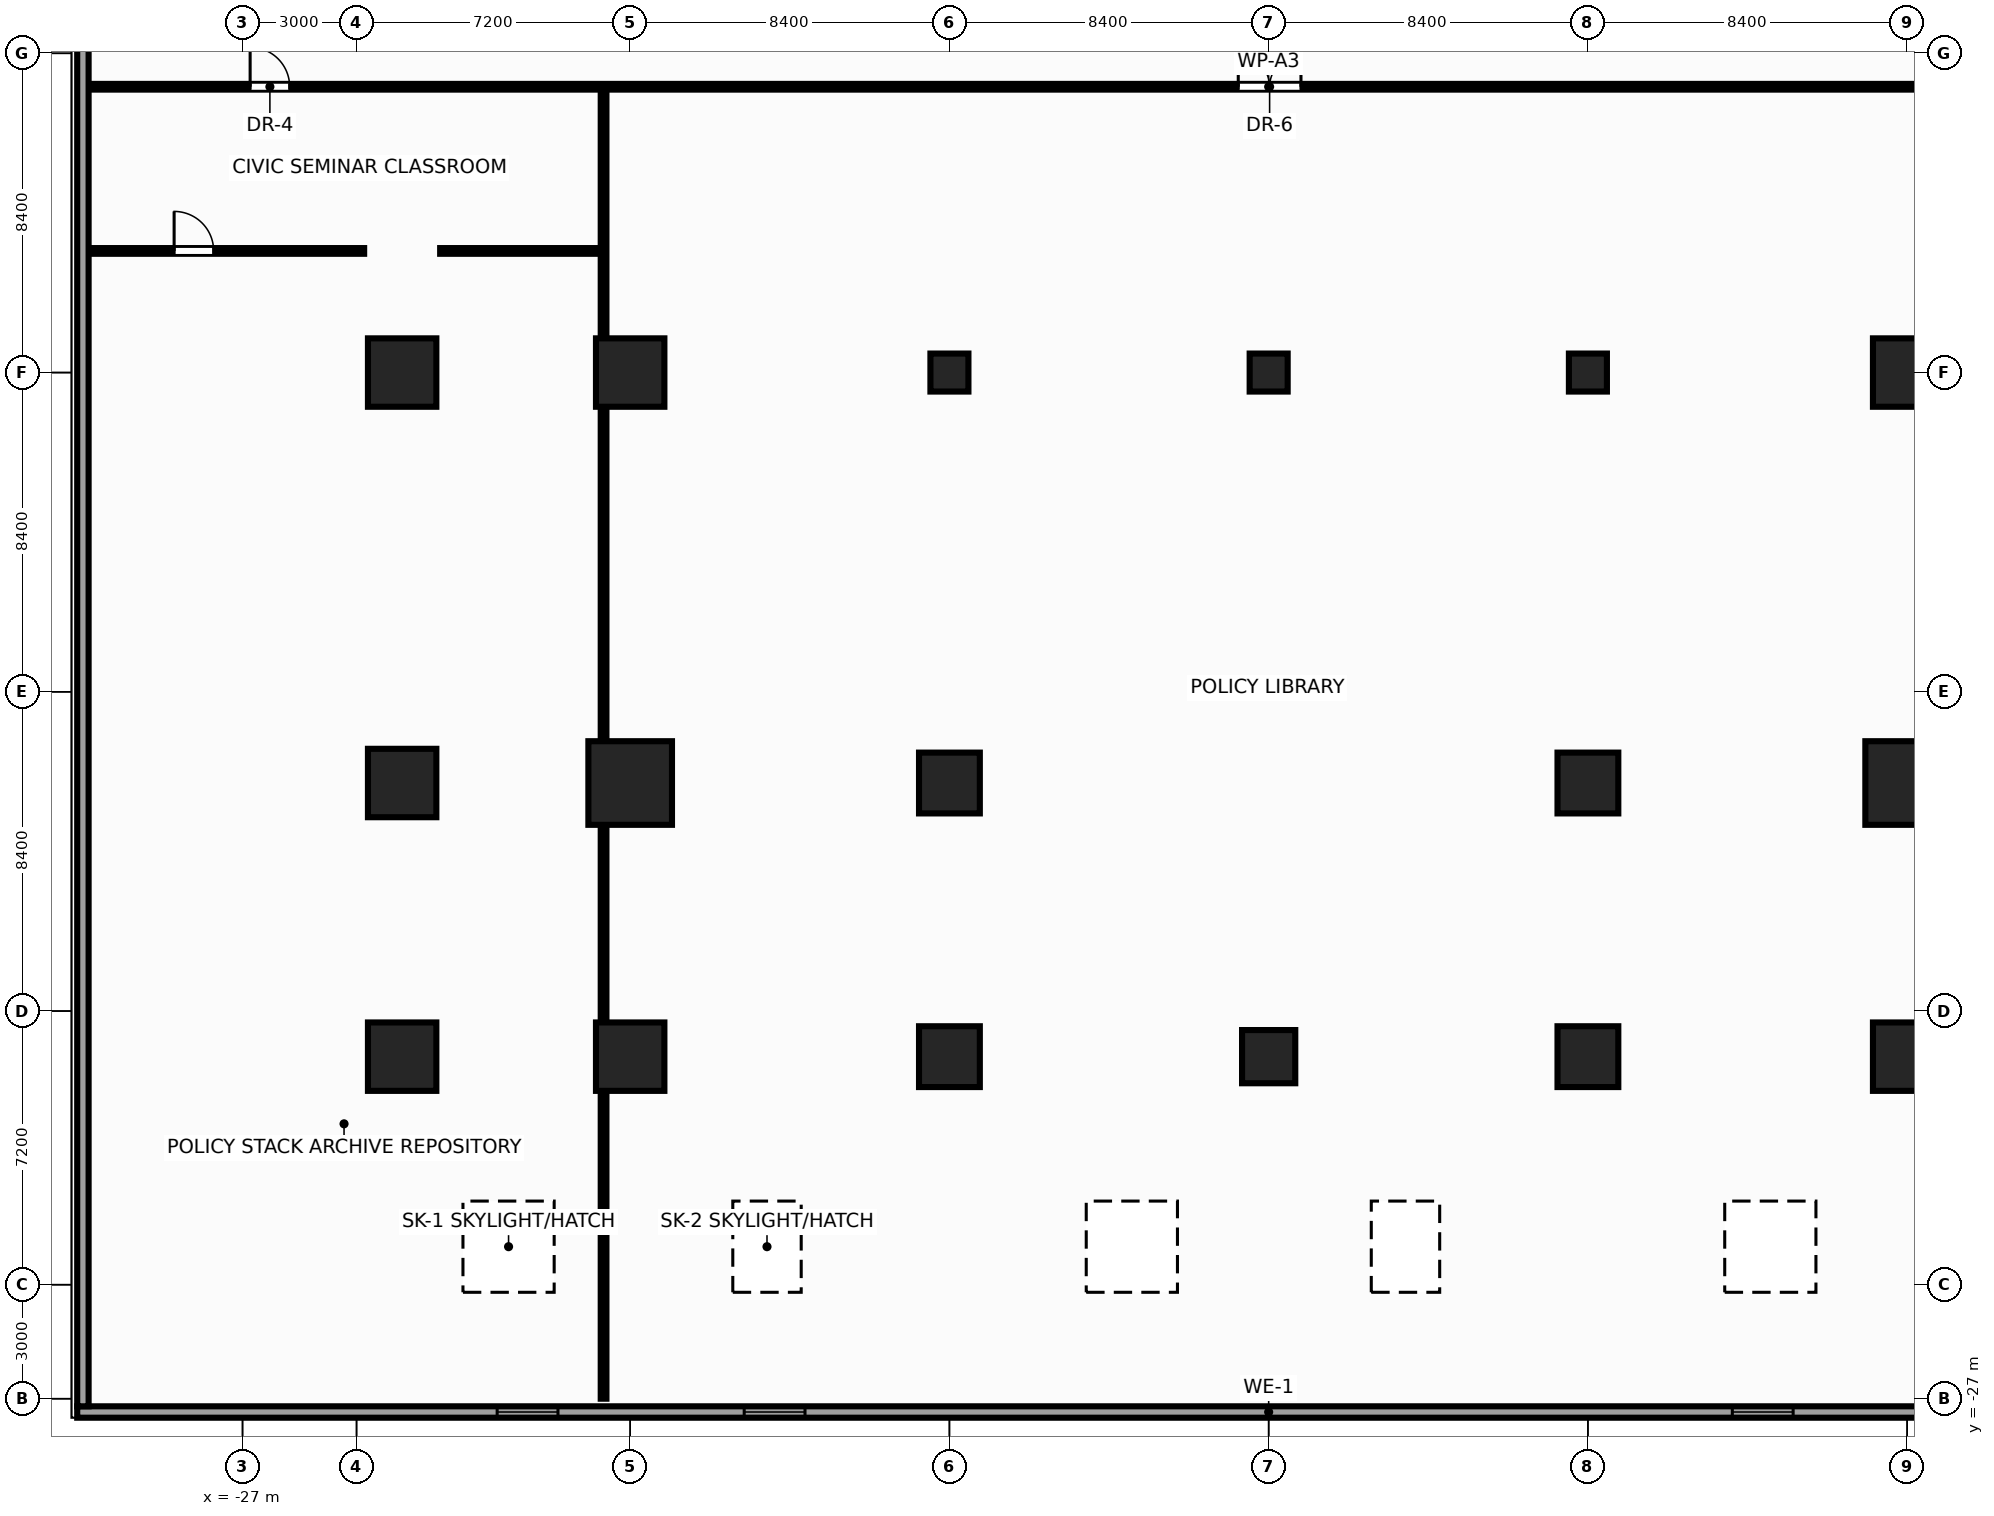
"""IFC4 building model, lengths in metres.
Left out: names, types, materials, properties, quantities, classifications, styles, units other than length and angle.
Written with IfcOpenShell. Run it as: python <this file> out.ifc"""

import sys

from ifc_helpers import new_model, si_unit, direction, frame, frame_2d, origin, origin_with_axes, origin_2d, place, context, subcontext, project, spatial, rectangle, hollow_rectangle, extrude, source, transform, mapped, element, fill, save


model = new_model("IFC4")
c1 = context("Model", 3, precision=1e-05, world=origin(), true_north=direction((0.0, 1.0)))
c2 = subcontext(c1, "Body", "Model", "MODEL_VIEW")
j1 = project(units=[si_unit("LENGTHUNIT", "METRE"), si_unit("PLANEANGLEUNIT", "RADIAN")], contexts=[c1])
p1 = place(None, origin())
s1 = spatial("IfcSite", under=j1, at=p1, CompositionType="ELEMENT")
p2 = place(p1, origin())
s2 = spatial("IfcBuilding", under=s1, at=p2, CompositionType="ELEMENT")
p3 = place(p2, frame((0.0, 0.0, 14.3)))
s3 = spatial("IfcBuildingStorey", under=s2, at=p3, CompositionType="ELEMENT", Elevation=14.3)
m1 = source(origin(), c2, "Body", "SweptSolid", [
    extrude(rectangle(XDim=1.8, YDim=1.8, at=origin_2d()), origin(), (0.0, 0.0, 1.0), 4.65),
])
p4 = place(p3, frame((-16.8, -18.0, 0.0), z_axis=(0.0, 0.0, 1.0), x_axis=(1.0, 0.0, 0.0)))
e1 = element("IfcColumn", 1, at=p4, inside=s3, PredefinedType="COLUMN", context=c2, shape_type="MappedRepresentation", body=[
    mapped(m1, transform((0.0, 0.0, 0.0), x_axis=(1.0, 0.0, 0.0), y_axis=(0.0, 1.0, 0.0), z_axis=(0.0, 0.0, 1.0), scale=1.0)),
])
m2 = source(origin(), c2, "Body", "SweptSolid", [
    extrude(rectangle(XDim=2.2, YDim=2.2, at=origin_2d()), origin(), (0.0, 0.0, 1.0), 4.65),
])
p5 = place(p3, frame((-16.8, -10.8, 0.0), z_axis=(0.0, 0.0, 1.0), x_axis=(1.0, 0.0, 0.0)))
e2 = element("IfcColumn", 2, at=p5, inside=s3, PredefinedType="COLUMN", context=c2, shape_type="MappedRepresentation", body=[
    mapped(m2, transform((0.0, 0.0, 0.0), x_axis=(1.0, 0.0, 0.0), y_axis=(0.0, 1.0, 0.0), z_axis=(0.0, 0.0, 1.0), scale=1.0)),
])
for number, where, z_axis, x_axis in (
    (3, (-16.8, 0.0, 0.0), (0.0, 0.0, 1.0), (1.0, 0.0, 0.0)),
    (4, (16.8, -18.0, 0.0), (0.0, 0.0, 1.0), (1.0, 0.0, 0.0)),
):
    element("IfcColumn", number, at=place(p3, frame(where, z_axis=z_axis, x_axis=x_axis)), inside=s3, PredefinedType="COLUMN", context=c2, shape_type="MappedRepresentation", body=[
        mapped(m1, transform((0.0, 0.0, 0.0), x_axis=(1.0, 0.0, 0.0), y_axis=(0.0, 1.0, 0.0), z_axis=(0.0, 0.0, 1.0), scale=1.0)),
    ])
p6 = place(p3, frame((16.8, -10.8, 0.0), z_axis=(0.0, 0.0, 1.0), x_axis=(1.0, 0.0, 0.0)))
e5 = element("IfcColumn", 5, at=p6, inside=s3, PredefinedType="COLUMN", context=c2, shape_type="MappedRepresentation", body=[
    mapped(m2, transform((0.0, 0.0, 0.0), x_axis=(1.0, 0.0, 0.0), y_axis=(0.0, 1.0, 0.0), z_axis=(0.0, 0.0, 1.0), scale=1.0)),
])
for number, where, z_axis, x_axis in (
    (6, (16.8, 0.0, 0.0), (0.0, 0.0, 1.0), (1.0, 0.0, 0.0)),
    (7, (-22.8, -18.0, 0.0), (0.0, 0.0, 1.0), (1.0, 0.0, 0.0)),
    (8, (-22.8, -10.8, 0.0), (0.0, 0.0, 1.0), (1.0, 0.0, 0.0)),
    (9, (-22.8, 0.0, 0.0), (0.0, 0.0, 1.0), (1.0, 0.0, 0.0)),
):
    element("IfcColumn", number, at=place(p3, frame(where, z_axis=z_axis, x_axis=x_axis)), inside=s3, PredefinedType="COLUMN", context=c2, shape_type="MappedRepresentation", body=[
        mapped(m1, transform((0.0, 0.0, 0.0), x_axis=(1.0, 0.0, 0.0), y_axis=(0.0, 1.0, 0.0), z_axis=(0.0, 0.0, 1.0), scale=1.0)),
    ])
m3 = source(origin(), c2, "Body", "SweptSolid", [
    extrude(rectangle(XDim=1.6, YDim=1.6, at=origin_2d()), origin(), (0.0, 0.0, 1.0), 4.65),
])
p7 = place(p3, frame((-8.4, -18.0, 0.0), z_axis=(0.0, 0.0, 1.0), x_axis=(1.0, 0.0, 0.0)))
e10 = element("IfcColumn", 10, at=p7, inside=s3, PredefinedType="COLUMN", context=c2, shape_type="MappedRepresentation", body=[
    mapped(m3, transform((0.0, 0.0, 0.0), x_axis=(1.0, 0.0, 0.0), y_axis=(0.0, 1.0, 0.0), z_axis=(0.0, 0.0, 1.0), scale=1.0)),
])
m4 = source(origin(), c2, "Body", "SweptSolid", [
    extrude(hollow_rectangle(XDim=1.0, YDim=1.0, WallThickness=0.045, at=origin_2d()), origin(), (0.0, 0.0, 1.0), 4.65),
])
p8 = place(p3, frame((-8.4, 0.0, 0.0), z_axis=(0.0, 0.0, 1.0), x_axis=(1.0, 0.0, 0.0)))
e11 = element("IfcColumn", 11, at=p8, inside=s3, PredefinedType="COLUMN", context=c2, shape_type="MappedRepresentation", body=[
    mapped(m4, transform((0.0, 0.0, 0.0), x_axis=(1.0, 0.0, 0.0), y_axis=(0.0, 1.0, 0.0), z_axis=(0.0, 0.0, 1.0), scale=1.0)),
])
for number, where, z_axis, x_axis in (
    (12, (-8.4, -10.8, 0.0), (0.0, 0.0, 1.0), (1.0, 0.0, 0.0)),
    (13, (8.4, -18.0, 0.0), (0.0, 0.0, 1.0), (1.0, 0.0, 0.0)),
):
    element("IfcColumn", number, at=place(p3, frame(where, z_axis=z_axis, x_axis=x_axis)), inside=s3, PredefinedType="COLUMN", context=c2, shape_type="MappedRepresentation", body=[
        mapped(m3, transform((0.0, 0.0, 0.0), x_axis=(1.0, 0.0, 0.0), y_axis=(0.0, 1.0, 0.0), z_axis=(0.0, 0.0, 1.0), scale=1.0)),
    ])
p9 = place(p3, frame((8.4, 0.0, 0.0), z_axis=(0.0, 0.0, 1.0), x_axis=(1.0, 0.0, 0.0)))
e14 = element("IfcColumn", 14, at=p9, inside=s3, PredefinedType="COLUMN", context=c2, shape_type="MappedRepresentation", body=[
    mapped(m4, transform((0.0, 0.0, 0.0), x_axis=(1.0, 0.0, 0.0), y_axis=(0.0, 1.0, 0.0), z_axis=(0.0, 0.0, 1.0), scale=1.0)),
])
p10 = place(p3, frame((8.4, -10.8, 0.0), z_axis=(0.0, 0.0, 1.0), x_axis=(1.0, 0.0, 0.0)))
e15 = element("IfcColumn", 15, at=p10, inside=s3, PredefinedType="COLUMN", context=c2, shape_type="MappedRepresentation", body=[
    mapped(m3, transform((0.0, 0.0, 0.0), x_axis=(1.0, 0.0, 0.0), y_axis=(0.0, 1.0, 0.0), z_axis=(0.0, 0.0, 1.0), scale=1.0)),
])
m5 = source(origin(), c2, "Body", "SweptSolid", [
    extrude(rectangle(XDim=1.4, YDim=1.4, at=origin_2d()), origin(), (0.0, 0.0, 1.0), 4.65),
])
p11 = place(p3, frame((0.0, -18.0, 0.0), z_axis=(0.0, 0.0, 1.0), x_axis=(1.0, 0.0, 0.0)))
e16 = element("IfcColumn", 16, at=p11, inside=s3, PredefinedType="COLUMN", context=c2, shape_type="MappedRepresentation", body=[
    mapped(m5, transform((0.0, 0.0, 0.0), x_axis=(1.0, 0.0, 0.0), y_axis=(0.0, 1.0, 0.0), z_axis=(0.0, 0.0, 1.0), scale=1.0)),
])
m6 = source(origin(), c2, "Body", "SweptSolid", [
    extrude(rectangle(XDim=1.0, YDim=1.0, at=origin_2d()), origin(), (0.0, 0.0, 1.0), 4.65),
])
p12 = place(p3, origin_with_axes())
e17 = element("IfcColumn", 17, at=p12, inside=s3, PredefinedType="COLUMN", context=c2, shape_type="MappedRepresentation", body=[
    mapped(m6, transform((0.0, 0.0, 0.0), x_axis=(1.0, 0.0, 0.0), y_axis=(0.0, 1.0, 0.0), z_axis=(0.0, 0.0, 1.0), scale=1.0)),
])
m7 = source(origin(), c2, "Body", "SweptSolid", [
    extrude(rectangle(XDim=62.7, YDim=0.3, at=frame_2d((31.35, 0.0))), origin(), (0.0, 0.0, 1.0), 3.83),
])
p13 = place(p3, frame((31.35, -27.35, 0.0), z_axis=(0.0, 0.0, 1.0), x_axis=(-1.0, 0.0, 0.0)))
e18 = element("IfcWall", 18, at=p13, inside=s3, PredefinedType="STANDARD", context=c2, shape_type="MappedRepresentation", body=[
    mapped(m7, transform((0.0, 0.0, 0.0), x_axis=(1.0, 0.0, 0.0), y_axis=(0.0, 1.0, 0.0), z_axis=(0.0, 0.0, 1.0), scale=1.0)),
])
p14 = place(p13, frame((11.05, 0.0, 0.9)))
e19 = element("IfcOpeningElement", 19, at=p14, cuts=e18, PredefinedType="OPENING", context=c2, shape_type="SweptSolid", body=[
    extrude(rectangle(XDim=1.6, YDim=2.1, at=frame_2d((0.8, 1.05))), frame((0.0, 0.162, 0.0), z_axis=(0.0, -1.0, 0.0), x_axis=(1.0, 0.0, 0.0)), (0.0, 0.0, 1.0), 0.324),
])
p15 = place(p13, frame((17.55, 0.0, 0.9)))
e20 = element("IfcOpeningElement", 20, at=p15, cuts=e18, PredefinedType="OPENING", context=c2, shape_type="SweptSolid", body=[
    extrude(rectangle(XDim=1.6, YDim=2.1, at=frame_2d((0.8, 1.05))), frame((0.0, 0.162, 0.0), z_axis=(0.0, -1.0, 0.0), x_axis=(1.0, 0.0, 0.0)), (0.0, 0.0, 1.0), 0.324),
])
p16 = place(p13, frame((43.55, 0.0, 0.9)))
e21 = element("IfcOpeningElement", 21, at=p16, cuts=e18, PredefinedType="OPENING", context=c2, shape_type="SweptSolid", body=[
    extrude(rectangle(XDim=1.6, YDim=2.1, at=frame_2d((0.8, 1.05))), frame((0.0, 0.162, 0.0), z_axis=(0.0, -1.0, 0.0), x_axis=(1.0, 0.0, 0.0)), (0.0, 0.0, 1.0), 0.324),
])
p17 = place(p13, frame((50.05, 0.0, 0.9)))
e22 = element("IfcOpeningElement", 22, at=p17, cuts=e18, PredefinedType="OPENING", context=c2, shape_type="SweptSolid", body=[
    extrude(rectangle(XDim=1.6, YDim=2.1, at=frame_2d((0.8, 1.05))), frame((0.0, 0.162, 0.0), z_axis=(0.0, -1.0, 0.0), x_axis=(1.0, 0.0, 0.0)), (0.0, 0.0, 1.0), 0.324),
])
m8 = source(origin(), c2, "Body", "SweptSolid", [
    extrude(rectangle(XDim=52.79, YDim=0.3, at=frame_2d((26.395, 0.0))), origin(), (0.0, 0.0, 1.0), 3.83),
])
p18 = place(p3, frame((-31.2, -27.2, 0.0), z_axis=(0.0, 0.0, 1.0), x_axis=(0.0, 1.0, 0.0)))
e23 = element("IfcWall", 23, at=p18, inside=s3, PredefinedType="STANDARD", context=c2, shape_type="MappedRepresentation", body=[
    mapped(m8, transform((0.0, 0.0, 0.0), x_axis=(1.0, 0.0, 0.0), y_axis=(0.0, 1.0, 0.0), z_axis=(0.0, 0.0, 1.0), scale=1.0)),
])
m9 = source(origin(), c2, "Body", "SweptSolid", [
    extrude(rectangle(XDim=62.0, YDim=0.15, at=frame_2d((31.0, 0.0))), origin(), (0.0, 0.0, 1.0), 3.715),
])
p19 = place(p3, frame((-31.0, 7.52, 0.0), z_axis=(0.0, 0.0, 1.0), x_axis=(1.0, 0.0, 0.0)))
e24 = element("IfcWall", 24, at=p19, inside=s3, PredefinedType="PARTITIONING", context=c2, shape_type="MappedRepresentation", body=[
    mapped(m9, transform((0.0, 0.0, 0.0), x_axis=(1.0, 0.0, 0.0), y_axis=(0.0, 1.0, 0.0), z_axis=(0.0, 0.0, 1.0), scale=1.0)),
])
p20 = place(p19, frame((4.2, 0.0, 0.0)))
e25 = element("IfcOpeningElement", 25, at=p20, cuts=e24, PredefinedType="OPENING", context=c2, shape_type="SweptSolid", body=[
    extrude(rectangle(XDim=1.04, YDim=2.2, at=frame_2d((0.52, 1.1))), frame((0.0, 0.087, 0.0), z_axis=(0.0, -1.0, 0.0), x_axis=(1.0, 0.0, 0.0)), (0.0, 0.0, 1.0), 0.174),
])
p21 = place(p19, frame((30.2, 0.0, 0.0)))
e26 = element("IfcOpeningElement", 26, at=p21, cuts=e24, PredefinedType="OPENING", context=c2, shape_type="SweptSolid", body=[
    extrude(rectangle(XDim=1.65, YDim=2.35, at=frame_2d((0.825, 1.175))), frame((0.0, 0.087, 0.0), z_axis=(0.0, -1.0, 0.0), x_axis=(1.0, 0.0, 0.0)), (0.0, 0.0, 1.0), 0.174),
])
p22 = place(p19, frame((56.7, 0.0, 0.0)))
e27 = element("IfcOpeningElement", 27, at=p22, cuts=e24, PredefinedType="OPENING", context=c2, shape_type="SweptSolid", body=[
    extrude(rectangle(XDim=1.04, YDim=2.2, at=frame_2d((0.52, 1.1))), frame((0.0, 0.087, 0.0), z_axis=(0.0, -1.0, 0.0), x_axis=(1.0, 0.0, 0.0)), (0.0, 0.0, 1.0), 0.174),
])
m10 = source(origin(), c2, "Body", "SweptSolid", [
    extrude(rectangle(XDim=34.38, YDim=0.15, at=frame_2d((17.19, 0.0))), origin(), (0.0, 0.0, 1.0), 3.715),
])
p23 = place(p3, frame((-17.5, -27.0, 0.0), z_axis=(0.0, 0.0, 1.0), x_axis=(0.0, 1.0, 0.0)))
e28 = element("IfcWall", 28, at=p23, inside=s3, PredefinedType="PARTITIONING", context=c2, shape_type="MappedRepresentation", body=[
    mapped(m10, transform((0.0, 0.0, 0.0), x_axis=(1.0, 0.0, 0.0), y_axis=(0.0, 1.0, 0.0), z_axis=(0.0, 0.0, 1.0), scale=1.0)),
])
m11 = source(origin(), c2, "Body", "SweptSolid", [
    extrude(rectangle(XDim=7.2, YDim=0.15, at=frame_2d((3.6, 0.0))), origin(), (0.0, 0.0, 1.0), 4.33),
])
p24 = place(p3, frame((-31.0, 3.2, 0.0), z_axis=(0.0, 0.0, 1.0), x_axis=(1.0, 0.0, 0.0)))
e29 = element("IfcWall", 29, at=p24, inside=s3, PredefinedType="PARTITIONING", context=c2, shape_type="MappedRepresentation", body=[
    mapped(m11, transform((0.0, 0.0, 0.0), x_axis=(1.0, 0.0, 0.0), y_axis=(0.0, 1.0, 0.0), z_axis=(0.0, 0.0, 1.0), scale=1.0)),
])
p25 = place(p24, frame((2.2, 0.0, 0.0)))
e30 = element("IfcOpeningElement", 30, at=p25, cuts=e29, PredefinedType="OPENING", context=c2, shape_type="SweptSolid", body=[
    extrude(rectangle(XDim=1.04, YDim=2.2, at=frame_2d((0.52, 1.1))), frame((0.0, 0.087, 0.0), z_axis=(0.0, -1.0, 0.0), x_axis=(1.0, 0.0, 0.0)), (0.0, 0.0, 1.0), 0.174),
])
m12 = source(origin(), c2, "Body", "SweptSolid", [
    extrude(rectangle(XDim=4.18, YDim=0.15, at=frame_2d((2.09, 0.0))), origin(), (0.0, 0.0, 1.0), 4.33),
])
p26 = place(p3, frame((-21.8, 3.2, 0.0), z_axis=(0.0, 0.0, 1.0), x_axis=(1.0, 0.0, 0.0)))
e31 = element("IfcWall", 31, at=p26, inside=s3, PredefinedType="PARTITIONING", context=c2, shape_type="MappedRepresentation", body=[
    mapped(m12, transform((0.0, 0.0, 0.0), x_axis=(1.0, 0.0, 0.0), y_axis=(0.0, 1.0, 0.0), z_axis=(0.0, 0.0, 1.0), scale=1.0)),
])
m13 = source(origin(), c2, "Body", "SweptSolid", [
    extrude(rectangle(XDim=1.6, YDim=2.1, at=frame_2d((0.8, 1.05))), frame((0.0, 0.03, 0.0), z_axis=(0.0, -1.0, 0.0), x_axis=(1.0, 0.0, 0.0)), (0.0, 0.0, 1.0), 0.06),
])
p27 = place(p15, origin())
e32 = element("IfcWindow", 32, at=p27, inside=s3, PartitioningType="SINGLE_PANEL", PredefinedType="WINDOW", context=c2, shape_type="MappedRepresentation", body=[
    mapped(m13, transform((0.0, 0.0, 0.0), x_axis=(1.0, 0.0, 0.0), y_axis=(0.0, 1.0, 0.0), z_axis=(0.0, 0.0, 1.0), scale=1.0)),
])
fill(e20, e32)
p28 = place(p16, origin())
e33 = element("IfcWindow", 33, at=p28, inside=s3, PartitioningType="SINGLE_PANEL", PredefinedType="WINDOW", context=c2, shape_type="MappedRepresentation", body=[
    mapped(m13, transform((0.0, 0.0, 0.0), x_axis=(1.0, 0.0, 0.0), y_axis=(0.0, 1.0, 0.0), z_axis=(0.0, 0.0, 1.0), scale=1.0)),
])
fill(e21, e33)
p29 = place(p17, origin())
e34 = element("IfcWindow", 34, at=p29, inside=s3, PartitioningType="SINGLE_PANEL", PredefinedType="WINDOW", context=c2, shape_type="MappedRepresentation", body=[
    mapped(m13, transform((0.0, 0.0, 0.0), x_axis=(1.0, 0.0, 0.0), y_axis=(0.0, 1.0, 0.0), z_axis=(0.0, 0.0, 1.0), scale=1.0)),
])
fill(e22, e34)
p30 = place(p3, frame((0.0, 0.0, -0.28)))
p31 = place(p30, frame((-20.0, -23.0, -0.012)))
p32 = place(p31, frame((0.0, 0.0, 0.242)))
e35 = element("IfcWindow", 35, at=p32, inside=s3, PartitioningType="SINGLE_PANEL", PredefinedType="SKYLIGHT", context=c2, shape_type="SweptSolid", body=[
    extrude(rectangle(XDim=2.4, YDim=2.4, at=origin_2d()), origin(), (0.0, 0.0, 1.0), 0.05),
])
p33 = place(p30, frame((-13.2, -23.0, -0.012)))
p34 = place(p33, frame((0.0, 0.0, 0.242)))
e36 = element("IfcWindow", 36, at=p34, inside=s3, PartitioningType="SINGLE_PANEL", PredefinedType="SKYLIGHT", context=c2, shape_type="SweptSolid", body=[
    extrude(rectangle(XDim=1.8, YDim=2.4, at=origin_2d()), origin(), (0.0, 0.0, 1.0), 0.05),
])
p35 = place(p30, frame((-3.6, -23.0, -0.012)))
p36 = place(p35, frame((0.0, 0.0, 0.242)))
e37 = element("IfcWindow", 37, at=p36, inside=s3, PartitioningType="SINGLE_PANEL", PredefinedType="SKYLIGHT", context=c2, shape_type="SweptSolid", body=[
    extrude(rectangle(XDim=2.4, YDim=2.4, at=origin_2d()), origin(), (0.0, 0.0, 1.0), 0.05),
])
p37 = place(p30, frame((3.6, -23.0, -0.012)))
p38 = place(p37, frame((0.0, 0.0, 0.242)))
e38 = element("IfcWindow", 38, at=p38, inside=s3, PartitioningType="SINGLE_PANEL", PredefinedType="SKYLIGHT", context=c2, shape_type="SweptSolid", body=[
    extrude(rectangle(XDim=1.8, YDim=2.4, at=origin_2d()), origin(), (0.0, 0.0, 1.0), 0.05),
])
p39 = place(p30, frame((13.2, -23.0, -0.012)))
p40 = place(p39, frame((0.0, 0.0, 0.242)))
e39 = element("IfcWindow", 39, at=p40, inside=s3, PartitioningType="SINGLE_PANEL", PredefinedType="SKYLIGHT", context=c2, shape_type="SweptSolid", body=[
    extrude(rectangle(XDim=2.4, YDim=2.4, at=origin_2d()), origin(), (0.0, 0.0, 1.0), 0.05),
])
m14 = source(origin(), c2, "Body", "SweptSolid", [
    extrude(rectangle(XDim=1.04, YDim=2.2, at=frame_2d((0.52, 1.1))), frame((0.0, 0.025, 0.0), z_axis=(0.0, -1.0, 0.0), x_axis=(1.0, 0.0, 0.0)), (0.0, 0.0, 1.0), 0.05),
])
p41 = place(p20, origin())
e40 = element("IfcDoor", 40, at=p41, inside=s3, OperationType="SINGLE_SWING_LEFT", PredefinedType="DOOR", context=c2, shape_type="MappedRepresentation", body=[
    mapped(m14, transform((0.0, 0.0, 0.0), x_axis=(1.0, 0.0, 0.0), y_axis=(0.0, 1.0, 0.0), z_axis=(0.0, 0.0, 1.0), scale=1.0)),
])
fill(e25, e40)
m15 = source(origin(), c2, "Body", "SweptSolid", [
    extrude(rectangle(XDim=1.65, YDim=2.35, at=frame_2d((0.825, 1.175))), frame((0.0, 0.025, 0.0), z_axis=(0.0, -1.0, 0.0), x_axis=(1.0, 0.0, 0.0)), (0.0, 0.0, 1.0), 0.05),
])
p42 = place(p21, origin())
e41 = element("IfcDoor", 41, at=p42, inside=s3, OperationType="DOUBLE_DOOR_SINGLE_SWING", PredefinedType="DOOR", context=c2, shape_type="MappedRepresentation", body=[
    mapped(m15, transform((0.0, 0.0, 0.0), x_axis=(1.0, 0.0, 0.0), y_axis=(0.0, 1.0, 0.0), z_axis=(0.0, 0.0, 1.0), scale=1.0)),
])
fill(e26, e41)
p43 = place(p25, origin())
e42 = element("IfcDoor", 42, at=p43, inside=s3, OperationType="SINGLE_SWING_LEFT", PredefinedType="DOOR", context=c2, shape_type="MappedRepresentation", body=[
    mapped(m14, transform((0.0, 0.0, 0.0), x_axis=(1.0, 0.0, 0.0), y_axis=(0.0, 1.0, 0.0), z_axis=(0.0, 0.0, 1.0), scale=1.0)),
])
fill(e30, e42)
save(model, sys.argv[1])
